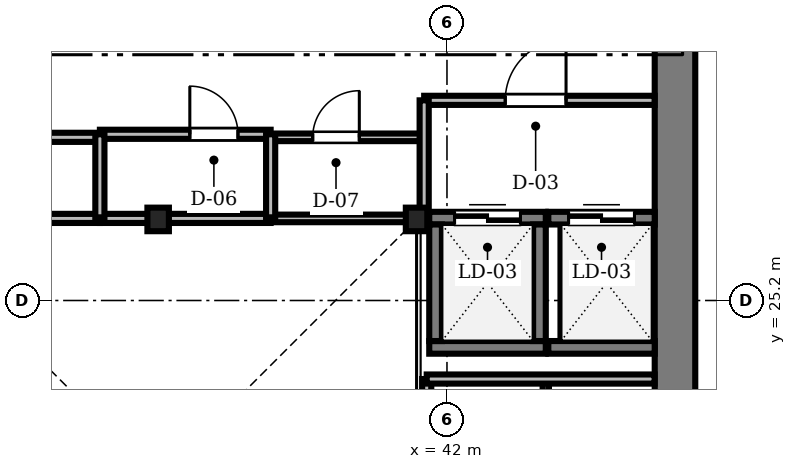
"""IFC4 building model, lengths in metres.
Left out: names, types, materials, properties, quantities, classifications, styles, units other than length and angle.
Written with IfcOpenShell. Run it as: python <this file> out.ifc"""

import sys

from ifc_helpers import new_model, si_unit, direction, frame, frame_2d, origin, origin_2d, place, context, subcontext, project, spatial, rectangle, i_section, extrude, source, transform, mapped, element, fill, save


model = new_model("IFC4")
c1 = context("Model", 3, precision=1e-05, world=origin(), true_north=direction((0.0, 1.0)))
c2 = subcontext(c1, "Body", "Model", "MODEL_VIEW")
j1 = project(units=[si_unit("LENGTHUNIT", "METRE"), si_unit("PLANEANGLEUNIT", "RADIAN")], contexts=[c1])
p1 = place(None, origin())
s1 = spatial("IfcSite", under=j1, at=p1, CompositionType="ELEMENT")
p2 = place(p1, origin())
s2 = spatial("IfcBuilding", under=s1, at=p2, CompositionType="ELEMENT")
p3 = place(p2, frame((0.0, 0.0, 137.2)))
s3 = spatial("IfcBuildingStorey", under=s2, at=p3, CompositionType="ELEMENT", Elevation=137.2)
m1 = source(origin(), c2, "Body", "SweptSolid", [
    extrude(rectangle(XDim=13.15, YDim=0.8, at=frame_2d((6.575, 0.0))), origin(), (0.0, 0.0, 1.0), 3.46),
])
p4 = place(p3, frame((46.5, 17.5, 0.0), z_axis=(0.0, 0.0, 1.0), x_axis=(0.0, 1.0, 0.0)))
e1 = element("IfcWall", 1, at=p4, inside=s3, PredefinedType="SHEAR", context=c2, shape_type="MappedRepresentation", body=[
    mapped(m1, transform((0.0, 0.0, 0.0), scale=1.0)),
])
m2 = source(origin(), c2, "Body", "SweptSolid", [
    extrude(i_section(OverallWidth=0.424, OverallDepth=0.465, WebThickness=0.035, FlangeThickness=0.056, FilletRadius=0.015, at=origin_2d()), origin(), (0.0, 0.0, 1.0), 3.46),
])
for number, where, z_axis, x_axis in (
    (2, (41.4, 26.8, 0.0), (0.0, 0.0, 1.0), (1.0, 0.0, 0.0)),
    (3, (36.3, 26.8, 0.0), (0.0, 0.0, 1.0), (1.0, 0.0, 0.0)),
):
    element("IfcColumn", number, at=place(p3, frame(where, z_axis=z_axis, x_axis=x_axis)), inside=s3, PredefinedType="COLUMN", context=c2, shape_type="MappedRepresentation", body=[
        mapped(m2, transform((0.0, 0.0, 0.0), scale=1.0)),
    ])
m3 = source(origin(), c2, "Body", "SweptSolid", [
    extrude(rectangle(XDim=2.3, YDim=0.25, at=frame_2d((1.15, 0.0))), origin(), (0.0, 0.0, 1.0), 3.46),
])
p5 = place(p3, frame((41.65, 24.275, 0.0), z_axis=(0.0, 0.0, 1.0), x_axis=(1.0, 0.0, 0.0)))
e4 = element("IfcWall", 4, at=p5, inside=s3, PredefinedType="SOLIDWALL", context=c2, shape_type="MappedRepresentation", body=[
    mapped(m3, transform((0.0, 0.0, 0.0), scale=1.0)),
])
p6 = place(p3, frame((41.65, 26.825, 0.0), z_axis=(0.0, 0.0, 1.0), x_axis=(1.0, 0.0, 0.0)))
e5 = element("IfcWall", 5, at=p6, inside=s3, PredefinedType="SOLIDWALL", context=c2, shape_type="MappedRepresentation", body=[
    mapped(m3, transform((0.0, 0.0, 0.0), scale=1.0)),
])
m4 = source(origin(), c2, "Body", "SweptSolid", [
    extrude(rectangle(XDim=1.3, YDim=2.3, at=frame_2d((0.65, 1.15))), frame((0.0, 0.135, 0.0), z_axis=(0.0, -1.0, 0.0), x_axis=(1.0, 0.0, 0.0)), (0.0, 0.0, 1.0), 0.27),
])
p7 = place(p6, frame((0.5, 0.0, 0.0)))
e6 = element("IfcOpeningElement", 6, at=p7, cuts=e5, PredefinedType="OPENING", context=c2, shape_type="MappedRepresentation", body=[
    mapped(m4, transform((0.0, 0.0, 0.0), scale=1.0)),
])
for number, where, z_axis, x_axis in (
    (7, (41.775, 24.4, 0.0), (0.0, 0.0, 1.0), (0.0, 1.0, 0.0)),
    (8, (43.825, 24.4, 0.0), (0.0, 0.0, 1.0), (0.0, 1.0, 0.0)),
):
    element("IfcWall", number, at=place(p3, frame(where, z_axis=z_axis, x_axis=x_axis)), inside=s3, PredefinedType="SOLIDWALL", context=c2, shape_type="MappedRepresentation", body=[
        mapped(m3, transform((0.0, 0.0, 0.0), scale=1.0)),
    ])
m5 = source(origin(), c2, "Body", "SweptSolid", [
    extrude(rectangle(XDim=2.1, YDim=0.25, at=frame_2d((1.05, 0.0))), origin(), (0.0, 0.0, 1.0), 3.46),
])
p8 = place(p3, frame((44.0, 24.275, 0.0), z_axis=(0.0, 0.0, 1.0), x_axis=(1.0, 0.0, 0.0)))
e9 = element("IfcWall", 9, at=p8, inside=s3, PredefinedType="SOLIDWALL", context=c2, shape_type="MappedRepresentation", body=[
    mapped(m5, transform((0.0, 0.0, 0.0), scale=1.0)),
])
p9 = place(p3, frame((44.0, 26.825, 0.0), z_axis=(0.0, 0.0, 1.0), x_axis=(1.0, 0.0, 0.0)))
e10 = element("IfcWall", 10, at=p9, inside=s3, PredefinedType="SOLIDWALL", context=c2, shape_type="MappedRepresentation", body=[
    mapped(m5, transform((0.0, 0.0, 0.0), scale=1.0)),
])
p10 = place(p9, frame((0.4, 0.0, 0.0)))
e11 = element("IfcOpeningElement", 11, at=p10, cuts=e10, PredefinedType="OPENING", context=c2, shape_type="MappedRepresentation", body=[
    mapped(m4, transform((0.0, 0.0, 0.0), scale=1.0)),
])
m6 = source(origin(), c2, "Body", "SweptSolid", [
    extrude(rectangle(XDim=4.548, YDim=0.18, at=frame_2d((2.274, 0.0))), origin(), (0.0, 0.0, 1.0), 3.092),
])
p11 = place(p3, frame((41.55, 29.15, 0.0), z_axis=(0.0, 0.0, 1.0), x_axis=(1.0, 0.0, 0.0)))
e12 = element("IfcWall", 12, at=p11, inside=s3, PredefinedType="PARTITIONING", context=c2, shape_type="MappedRepresentation", body=[
    mapped(m6, transform((0.0, 0.0, 0.0), scale=1.0)),
])
m7 = source(origin(), c2, "Body", "SweptSolid", [
    extrude(rectangle(XDim=1.2, YDim=2.2, at=frame_2d((0.6, 1.1))), frame((0.0, 0.1, 0.0), z_axis=(0.0, -1.0, 0.0), x_axis=(1.0, 0.0, 0.0)), (0.0, 0.0, 1.0), 0.2),
])
p12 = place(p11, frame((1.6, 0.0, 0.0)))
e13 = element("IfcOpeningElement", 13, at=p12, cuts=e12, PredefinedType="OPENING", context=c2, shape_type="MappedRepresentation", body=[
    mapped(m7, transform((0.0, 0.0, 0.0), scale=1.0)),
])
m8 = source(origin(), c2, "Body", "SweptSolid", [
    extrude(rectangle(XDim=3.7, YDim=0.18, at=frame_2d((1.85, 0.0))), origin(), (0.0, 0.0, 1.0), 3.092),
])
p13 = place(p3, frame((31.45, 28.42, 0.0), z_axis=(0.0, 0.0, 1.0), x_axis=(1.0, 0.0, 0.0)))
e14 = element("IfcWall", 14, at=p13, inside=s3, PredefinedType="PARTITIONING", context=c2, shape_type="MappedRepresentation", body=[
    mapped(m8, transform((0.0, 0.0, 0.0), scale=1.0)),
])
m9 = source(origin(), c2, "Body", "SweptSolid", [
    extrude(rectangle(XDim=0.92, YDim=2.1, at=frame_2d((0.46, 1.05))), frame((0.0, 0.1, 0.0), z_axis=(0.0, -1.0, 0.0), x_axis=(1.0, 0.0, 0.0)), (0.0, 0.0, 1.0), 0.2),
])
p14 = place(p13, frame((0.9, 0.0, 0.0)))
e15 = element("IfcOpeningElement", 15, at=p14, cuts=e14, PredefinedType="OPENING", context=c2, shape_type="MappedRepresentation", body=[
    mapped(m9, transform((0.0, 0.0, 0.0), scale=1.0)),
])
m10 = source(origin(), c2, "Body", "SweptSolid", [
    extrude(rectangle(XDim=3.37, YDim=0.18, at=frame_2d((1.685, 0.0))), origin(), (0.0, 0.0, 1.0), 3.46),
])
p15 = place(p3, frame((35.15, 28.48, 0.0), z_axis=(0.0, 0.0, 1.0), x_axis=(1.0, 0.0, 0.0)))
e16 = element("IfcWall", 16, at=p15, inside=s3, PredefinedType="PARTITIONING", context=c2, shape_type="MappedRepresentation", body=[
    mapped(m10, transform((0.0, 0.0, 0.0), scale=1.0)),
])
m11 = source(origin(), c2, "Body", "SweptSolid", [
    extrude(rectangle(XDim=0.95, YDim=2.15, at=frame_2d((0.475, 1.075))), frame((0.0, 0.1, 0.0), z_axis=(0.0, -1.0, 0.0), x_axis=(1.0, 0.0, 0.0)), (0.0, 0.0, 1.0), 0.2),
])
p16 = place(p15, frame((1.775, 0.0, 0.0)))
e17 = element("IfcOpeningElement", 17, at=p16, cuts=e16, PredefinedType="OPENING", context=c2, shape_type="MappedRepresentation", body=[
    mapped(m11, transform((0.0, 0.0, 0.0), scale=1.0)),
])
m12 = source(origin(), c2, "Body", "SweptSolid", [
    extrude(rectangle(XDim=3.0, YDim=0.15, at=frame_2d((1.5, 0.0))), origin(), (0.0, 0.0, 1.0), 3.46),
])
p17 = place(p3, frame((38.52, 28.42, 0.0), z_axis=(0.0, 0.0, 1.0), x_axis=(1.0, 0.0, 0.0)))
e18 = element("IfcWall", 18, at=p17, inside=s3, PredefinedType="PARTITIONING", context=c2, shape_type="MappedRepresentation", body=[
    mapped(m12, transform((0.0, 0.0, 0.0), scale=1.0)),
])
m13 = source(origin(), c2, "Body", "SweptSolid", [
    extrude(rectangle(XDim=0.92, YDim=2.1, at=frame_2d((0.46, 1.05))), frame((0.0, 0.085, 0.0), z_axis=(0.0, -1.0, 0.0), x_axis=(1.0, 0.0, 0.0)), (0.0, 0.0, 1.0), 0.17),
])
p18 = place(p17, frame((0.83, 0.0, 0.0)))
e19 = element("IfcOpeningElement", 19, at=p18, cuts=e18, PredefinedType="OPENING", context=c2, shape_type="MappedRepresentation", body=[
    mapped(m13, transform((0.0, 0.0, 0.0), scale=1.0)),
])
m14 = source(origin(), c2, "Body", "SweptSolid", [
    extrude(rectangle(XDim=7.15, YDim=0.18, at=frame_2d((3.575, 0.0))), origin(), (0.0, 0.0, 1.0), 2.852),
])
p19 = place(p3, frame((41.6, 16.5, 0.0), z_axis=(0.0, 0.0, 1.0), x_axis=(0.0, 1.0, 0.0)))
e20 = element("IfcWall", 20, at=p19, inside=s3, PredefinedType="PARTITIONING", context=c2, shape_type="MappedRepresentation", body=[
    mapped(m14, transform((0.0, 0.0, 0.0), scale=1.0)),
])
m15 = source(origin(), c2, "Body", "SweptSolid", [
    extrude(rectangle(XDim=7.15, YDim=0.125, at=frame_2d((3.575, 0.0))), origin(), (0.0, 0.0, 1.0), 2.852),
])
p20 = place(p3, frame((43.95, 16.5, 0.0), z_axis=(0.0, 0.0, 1.0), x_axis=(0.0, 1.0, 0.0)))
e21 = element("IfcWall", 21, at=p20, inside=s3, PredefinedType="PARTITIONING", context=c2, shape_type="MappedRepresentation", body=[
    mapped(m15, transform((0.0, 0.0, 0.0), scale=1.0)),
])
m16 = source(origin(), c2, "Body", "SweptSolid", [
    extrude(rectangle(XDim=4.498, YDim=0.18, at=frame_2d((2.249, 0.0))), origin(), (0.0, 0.0, 1.0), 3.46),
])
p21 = place(p3, frame((41.6, 23.65, 0.0), z_axis=(0.0, 0.0, 1.0), x_axis=(1.0, 0.0, 0.0)))
e22 = element("IfcWall", 22, at=p21, inside=s3, PredefinedType="PARTITIONING", context=c2, shape_type="MappedRepresentation", body=[
    mapped(m16, transform((0.0, 0.0, 0.0), scale=1.0)),
])
m17 = source(origin(), c2, "Body", "SweptSolid", [
    extrude(rectangle(XDim=3.7, YDim=0.18, at=frame_2d((1.85, 0.0))), origin(), (0.0, 0.0, 1.0), 3.002),
])
p22 = place(p3, frame((31.45, 26.82, 0.0), z_axis=(0.0, 0.0, 1.0), x_axis=(1.0, 0.0, 0.0)))
e23 = element("IfcWall", 23, at=p22, inside=s3, PredefinedType="PARTITIONING", context=c2, shape_type="MappedRepresentation", body=[
    mapped(m17, transform((0.0, 0.0, 0.0), scale=1.0)),
])
m18 = source(origin(), c2, "Body", "SweptSolid", [
    extrude(rectangle(XDim=3.37, YDim=0.18, at=frame_2d((1.685, 0.0))), origin(), (0.0, 0.0, 1.0), 3.002),
])
p23 = place(p3, frame((35.15, 26.82, 0.0), z_axis=(0.0, 0.0, 1.0), x_axis=(1.0, 0.0, 0.0)))
e24 = element("IfcWall", 24, at=p23, inside=s3, PredefinedType="PARTITIONING", context=c2, shape_type="MappedRepresentation", body=[
    mapped(m18, transform((0.0, 0.0, 0.0), scale=1.0)),
])
m19 = source(origin(), c2, "Body", "SweptSolid", [
    extrude(rectangle(XDim=3.0, YDim=0.15, at=frame_2d((1.5, 0.0))), origin(), (0.0, 0.0, 1.0), 2.852),
])
p24 = place(p3, frame((38.52, 26.82, 0.0), z_axis=(0.0, 0.0, 1.0), x_axis=(1.0, 0.0, 0.0)))
e25 = element("IfcWall", 25, at=p24, inside=s3, PredefinedType="PARTITIONING", context=c2, shape_type="MappedRepresentation", body=[
    mapped(m19, transform((0.0, 0.0, 0.0), scale=1.0)),
])
m20 = source(origin(), c2, "Body", "SweptSolid", [
    extrude(rectangle(XDim=2.35, YDim=0.18, at=frame_2d((1.175, 0.0))), origin(), (0.0, 0.0, 1.0), 2.852),
])
p25 = place(p3, frame((41.55, 26.8, 0.0), z_axis=(0.0, 0.0, 1.0), x_axis=(0.0, 1.0, 0.0)))
e26 = element("IfcWall", 26, at=p25, inside=s3, PredefinedType="PARTITIONING", context=c2, shape_type="MappedRepresentation", body=[
    mapped(m20, transform((0.0, 0.0, 0.0), scale=1.0)),
])
m21 = source(origin(), c2, "Body", "SweptSolid", [
    extrude(rectangle(XDim=1.66, YDim=0.18, at=frame_2d((0.83, 0.0))), origin(), (0.0, 0.0, 1.0), 3.002),
])
for number, where, z_axis, x_axis in (
    (27, (35.15, 26.82, 0.0), (0.0, 0.0, 1.0), (0.0, 1.0, 0.0)),
    (28, (38.52, 26.82, 0.0), (0.0, 0.0, 1.0), (0.0, 1.0, 0.0)),
):
    element("IfcWall", number, at=place(p3, frame(where, z_axis=z_axis, x_axis=x_axis)), inside=s3, PredefinedType="PARTITIONING", context=c2, shape_type="MappedRepresentation", body=[
        mapped(m21, transform((0.0, 0.0, 0.0), scale=1.0)),
    ])
m22 = source(origin(), c2, "Body", "SweptSolid", [
    extrude(rectangle(XDim=1.3, YDim=2.3, at=frame_2d((0.65, 1.15))), frame((0.0, 0.025, 0.0), z_axis=(0.0, -1.0, 0.0), x_axis=(1.0, 0.0, 0.0)), (0.0, 0.0, 1.0), 0.05),
])
p26 = place(p7, origin())
e29 = element("IfcDoor", 29, at=p26, inside=s3, OperationType="DOUBLE_DOOR_SLIDING", PredefinedType="DOOR", context=c2, shape_type="MappedRepresentation", body=[
    mapped(m22, transform((0.0, 0.0, 0.0), scale=1.0)),
])
fill(e6, e29)
p27 = place(p10, origin())
e30 = element("IfcDoor", 30, at=p27, inside=s3, OperationType="DOUBLE_DOOR_SLIDING", PredefinedType="DOOR", context=c2, shape_type="MappedRepresentation", body=[
    mapped(m22, transform((0.0, 0.0, 0.0), scale=1.0)),
])
fill(e11, e30)
m23 = source(origin(), c2, "Body", "SweptSolid", [
    extrude(rectangle(XDim=1.2, YDim=2.2, at=frame_2d((0.6, 1.1))), frame((0.0, 0.025, 0.0), z_axis=(0.0, -1.0, 0.0), x_axis=(1.0, 0.0, 0.0)), (0.0, 0.0, 1.0), 0.05),
])
p28 = place(p12, origin())
e31 = element("IfcDoor", 31, at=p28, inside=s3, OperationType="SINGLE_SWING_RIGHT", PredefinedType="DOOR", context=c2, shape_type="MappedRepresentation", body=[
    mapped(m23, transform((0.0, 0.0, 0.0), scale=1.0)),
])
fill(e13, e31)
m24 = source(origin(), c2, "Body", "SweptSolid", [
    extrude(rectangle(XDim=0.95, YDim=2.15, at=frame_2d((0.475, 1.075))), frame((0.0, 0.025, 0.0), z_axis=(0.0, -1.0, 0.0), x_axis=(1.0, 0.0, 0.0)), (0.0, 0.0, 1.0), 0.05),
])
p29 = place(p16, origin())
e32 = element("IfcDoor", 32, at=p29, inside=s3, OperationType="SINGLE_SWING_LEFT", PredefinedType="DOOR", context=c2, shape_type="MappedRepresentation", body=[
    mapped(m24, transform((0.0, 0.0, 0.0), scale=1.0)),
])
fill(e17, e32)
m25 = source(origin(), c2, "Body", "SweptSolid", [
    extrude(rectangle(XDim=0.92, YDim=2.1, at=frame_2d((0.46, 1.05))), frame((0.0, 0.025, 0.0), z_axis=(0.0, -1.0, 0.0), x_axis=(1.0, 0.0, 0.0)), (0.0, 0.0, 1.0), 0.05),
])
p30 = place(p18, origin())
e33 = element("IfcDoor", 33, at=p30, inside=s3, OperationType="SINGLE_SWING_RIGHT", PredefinedType="DOOR", context=c2, shape_type="MappedRepresentation", body=[
    mapped(m25, transform((0.0, 0.0, 0.0), scale=1.0)),
])
fill(e19, e33)
save(model, sys.argv[1])
